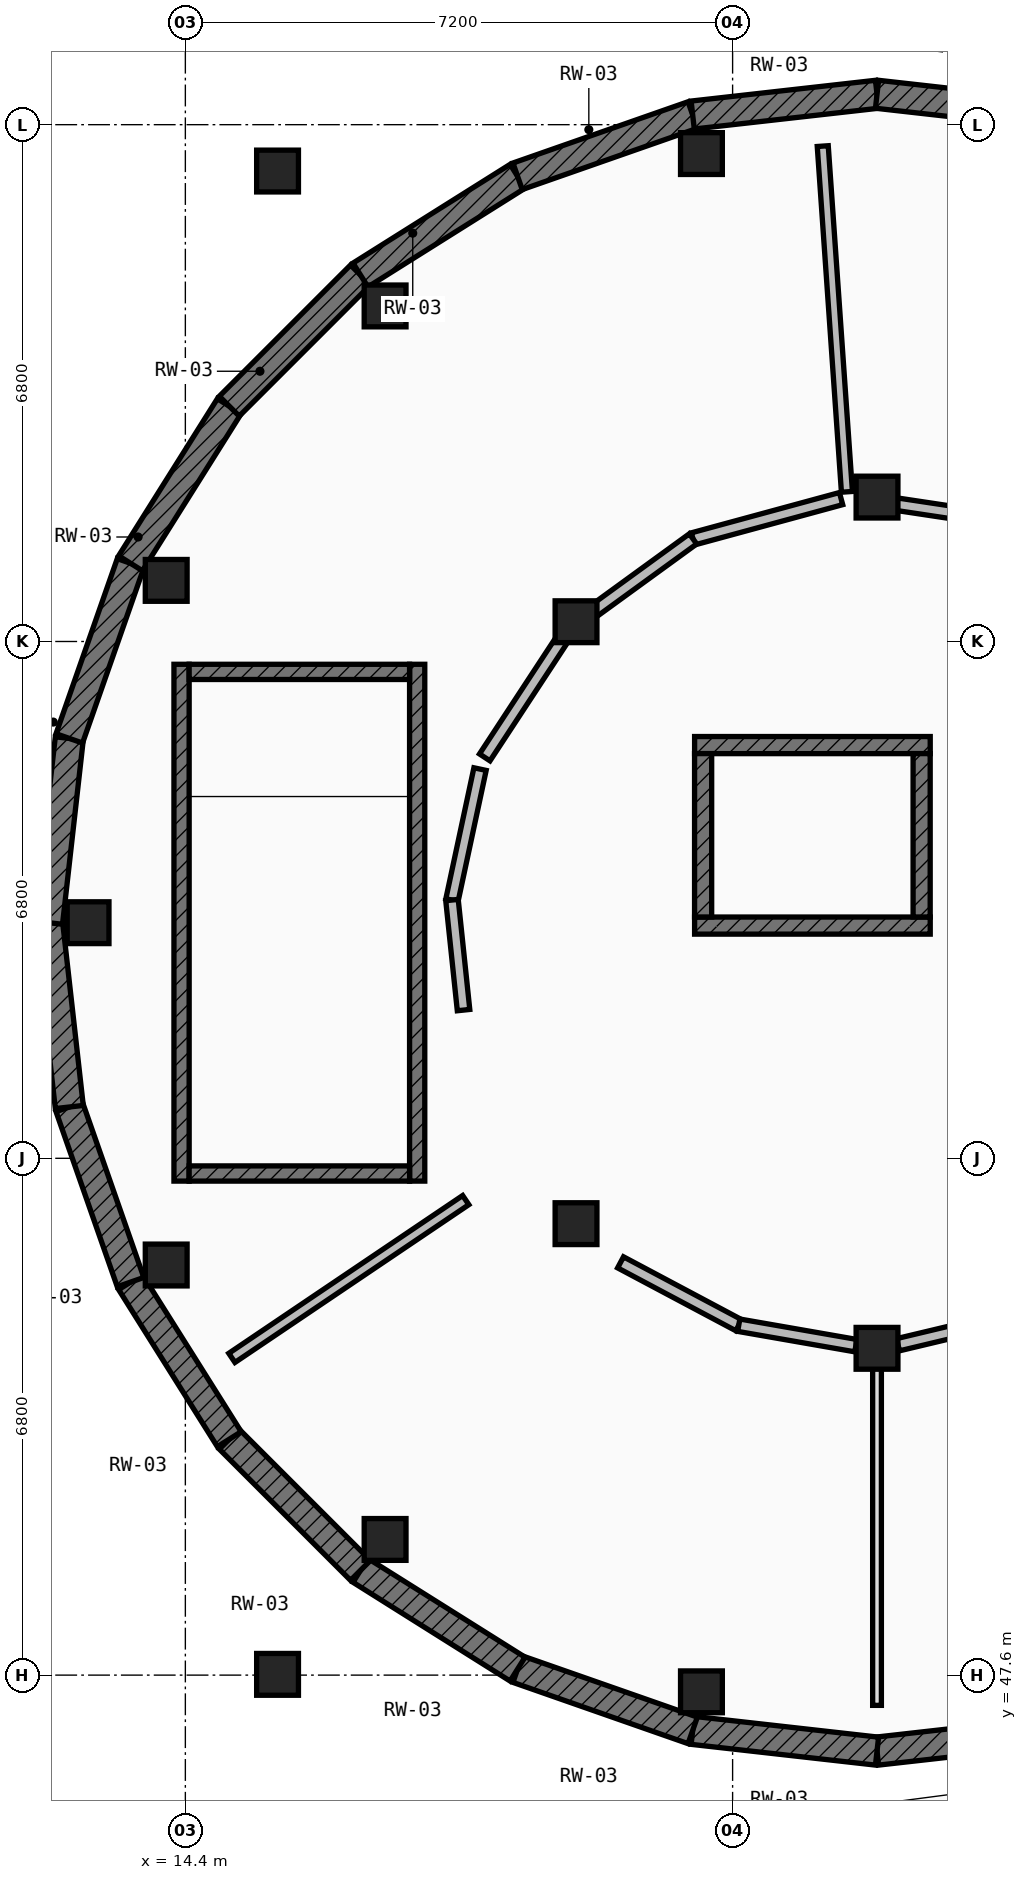
"""IFC4 building model, lengths in metres.
Left out: names, types, materials, properties, quantities, classifications, styles, units other than length and angle.
Written with IfcOpenShell. Run it as: python <this file> out.ifc"""

import sys

from ifc_helpers import new_model, si_unit, direction, frame, frame_2d, origin, origin_2d, place, context, subcontext, project, spatial, rectangle, extrude, element, fill, save


model = new_model("IFC4")
c1 = context("Model", 3, precision=1e-05, world=origin(), true_north=direction((0.0, 1.0)))
c2 = subcontext(c1, "Body", "Model", "MODEL_VIEW")
j1 = project(units=[si_unit("LENGTHUNIT", "METRE"), si_unit("PLANEANGLEUNIT", "RADIAN")], contexts=[c1])
p1 = place(None, origin())
s1 = spatial("IfcSite", under=j1, at=p1, CompositionType="ELEMENT")
p2 = place(p1, origin())
s2 = spatial("IfcBuilding", under=s1, at=p2, CompositionType="ELEMENT")
p3 = place(p2, frame((0.0, 0.0, -4.55)))
s3 = spatial("IfcBuildingStorey", under=s2, at=p3, CompositionType="ELEMENT", Elevation=-4.55)
for number, where, z_axis, x_axis in (
    (1, (21.19, 67.62, 0.0), (0.0, 0.0, 1.0), (1.0, 0.0, 0.0)),
    (2, (17.028, 65.615, 0.0), (0.0, 0.0, 1.0), (1.0, 0.0, 0.0)),
    (3, (14.148, 62.004, 0.0), (0.0, 0.0, 1.0), (1.0, 0.0, 0.0)),
    (4, (13.12, 57.5, 0.0), (0.0, 0.0, 1.0), (1.0, 0.0, 0.0)),
    (5, (14.148, 52.996, 0.0), (0.0, 0.0, 1.0), (1.0, 0.0, 0.0)),
    (6, (17.028, 49.385, 0.0), (0.0, 0.0, 1.0), (1.0, 0.0, 0.0)),
    (7, (21.19, 47.38, 0.0), (0.0, 0.0, 1.0), (1.0, 0.0, 0.0)),
    (8, (23.5, 63.1, 0.0), (0.0, 0.0, 1.0), (1.0, 0.0, 0.0)),
    (9, (19.54, 61.46, 0.0), (0.0, 0.0, 1.0), (1.0, 0.0, 0.0)),
    (10, (19.54, 53.54, 0.0), (0.0, 0.0, 1.0), (1.0, 0.0, 0.0)),
    (11, (23.5, 51.9, 0.0), (0.0, 0.0, 1.0), (1.0, 0.0, 0.0)),
):
    element("IfcColumn", number, at=place(p3, frame(where, z_axis=z_axis, x_axis=x_axis)), inside=s3, PredefinedType="COLUMN", context=c2, shape_type="SweptSolid", body=[
        extrude(rectangle(XDim=0.55, YDim=0.55, at=origin_2d()), origin(), (0.0, 0.0, 1.0), 4.55),
    ])
for number, where, z_axis, x_axis in (
    (12, (15.613, 67.39, 0.0), (0.0, 0.0, 1.0), (1.0, 0.0, 0.0)),
    (13, (15.613, 47.61, 0.0), (0.0, 0.0, 1.0), (1.0, 0.0, 0.0)),
):
    element("IfcColumn", number, at=place(p3, frame(where, z_axis=z_axis, x_axis=x_axis)), inside=s3, PredefinedType="COLUMN", context=c2, shape_type="SweptSolid", body=[
        extrude(rectangle(XDim=0.55, YDim=0.55, at=origin_2d()), origin(), (0.0, 0.0, 1.0), 5.7),
    ])
for number, where, z_axis, x_axis in (
    (14, (25.925, 46.873, 0.0), (0.0, 0.0, 1.0), (-0.994, -0.112, 0.0)),
    (15, (23.5, 46.6, 0.0), (0.0, 0.0, 1.0), (-0.994, 0.112, 0.0)),
):
    element("IfcWall", number, at=place(p3, frame(where, z_axis=z_axis, x_axis=x_axis)), inside=s3, PredefinedType="USERDEFINED", context=c2, shape_type="SweptSolid", body=[
        extrude(rectangle(XDim=2.44, YDim=0.37, at=frame_2d((1.22, 0.0))), origin(), (0.0, 0.0, 1.0), 3.335),
    ])
p4 = place(p3, frame((21.075, 46.873, 0.0), z_axis=(0.0, 0.0, 1.0), x_axis=(-0.943919156274, 0.330176659411, 0.0)))
e16 = element("IfcWall", 16, at=p4, inside=s3, PredefinedType="USERDEFINED", context=c2, shape_type="SweptSolid", body=[
    extrude(rectangle(XDim=2.441, YDim=0.37, at=frame_2d((1.22, 0.0))), origin(), (0.0, 0.0, 1.0), 3.335),
])
p5 = place(p3, frame((18.771, 47.679, 0.0), z_axis=(0.0, 0.0, 1.0), x_axis=(-0.846658434148, 0.532136726684, 0.0)))
e17 = element("IfcWall", 17, at=p5, inside=s3, PredefinedType="USERDEFINED", context=c2, shape_type="SweptSolid", body=[
    extrude(rectangle(XDim=2.441, YDim=0.37, at=frame_2d((1.221, 0.0))), origin(), (0.0, 0.0, 1.0), 3.335),
])
p6 = place(p3, frame((16.704, 48.978, 0.0), z_axis=(0.0, 0.0, 1.0), x_axis=(-0.707106781187, 0.707106781187, 0.0)))
e18 = element("IfcWall", 18, at=p6, inside=s3, PredefinedType="USERDEFINED", context=c2, shape_type="SweptSolid", body=[
    extrude(rectangle(XDim=2.441, YDim=0.37, at=frame_2d((1.22, 0.0))), origin(), (0.0, 0.0, 1.0), 3.335),
])
p7 = place(p3, frame((14.978, 50.704, 0.0), z_axis=(0.0, 0.0, 1.0), x_axis=(-0.532136726684, 0.846658434148, 0.0)))
e19 = element("IfcWall", 19, at=p7, inside=s3, PredefinedType="USERDEFINED", context=c2, shape_type="SweptSolid", body=[
    extrude(rectangle(XDim=2.441, YDim=0.37, at=frame_2d((1.221, 0.0))), origin(), (0.0, 0.0, 1.0), 3.335),
])
p8 = place(p3, frame((13.679, 52.771, 0.0), z_axis=(0.0, 0.0, 1.0), x_axis=(-0.330176659411, 0.943919156274, 0.0)))
e20 = element("IfcWall", 20, at=p8, inside=s3, PredefinedType="USERDEFINED", context=c2, shape_type="SweptSolid", body=[
    extrude(rectangle(XDim=2.441, YDim=0.37, at=frame_2d((1.22, 0.0))), origin(), (0.0, 0.0, 1.0), 3.335),
])
for number, where, z_axis, x_axis in (
    (21, (12.873, 55.075, 0.0), (0.0, 0.0, 1.0), (-0.112, 0.994, 0.0)),
    (22, (12.6, 57.5, 0.0), (0.0, 0.0, 1.0), (0.112, 0.994, 0.0)),
):
    element("IfcWall", number, at=place(p3, frame(where, z_axis=z_axis, x_axis=x_axis)), inside=s3, PredefinedType="USERDEFINED", context=c2, shape_type="SweptSolid", body=[
        extrude(rectangle(XDim=2.44, YDim=0.37, at=frame_2d((1.22, 0.0))), origin(), (0.0, 0.0, 1.0), 3.335),
    ])
p9 = place(p3, frame((12.873, 59.925, 0.0), z_axis=(0.0, 0.0, 1.0), x_axis=(0.330176659411, 0.943919156274, 0.0)))
e23 = element("IfcWall", 23, at=p9, inside=s3, PredefinedType="USERDEFINED", context=c2, shape_type="SweptSolid", body=[
    extrude(rectangle(XDim=2.441, YDim=0.37, at=frame_2d((1.22, 0.0))), origin(), (0.0, 0.0, 1.0), 3.335),
])
p10 = place(p3, frame((13.679, 62.229, 0.0), z_axis=(0.0, 0.0, 1.0), x_axis=(0.532136726684, 0.846658434148, 0.0)))
e24 = element("IfcWall", 24, at=p10, inside=s3, PredefinedType="USERDEFINED", context=c2, shape_type="SweptSolid", body=[
    extrude(rectangle(XDim=2.441, YDim=0.37, at=frame_2d((1.221, 0.0))), origin(), (0.0, 0.0, 1.0), 3.335),
])
p11 = place(p3, frame((14.978, 64.296, 0.0), z_axis=(0.0, 0.0, 1.0), x_axis=(0.707106781187, 0.707106781187, 0.0)))
e25 = element("IfcWall", 25, at=p11, inside=s3, PredefinedType="USERDEFINED", context=c2, shape_type="SweptSolid", body=[
    extrude(rectangle(XDim=2.441, YDim=0.37, at=frame_2d((1.22, 0.0))), origin(), (0.0, 0.0, 1.0), 3.335),
])
p12 = place(p3, frame((16.704, 66.022, 0.0), z_axis=(0.0, 0.0, 1.0), x_axis=(0.846658434148, 0.532136726684, 0.0)))
e26 = element("IfcWall", 26, at=p12, inside=s3, PredefinedType="USERDEFINED", context=c2, shape_type="SweptSolid", body=[
    extrude(rectangle(XDim=2.441, YDim=0.37, at=frame_2d((1.221, 0.0))), origin(), (0.0, 0.0, 1.0), 3.335),
])
p13 = place(p3, frame((18.771, 67.321, 0.0), z_axis=(0.0, 0.0, 1.0), x_axis=(0.943919156274, 0.330176659411, 0.0)))
e27 = element("IfcWall", 27, at=p13, inside=s3, PredefinedType="USERDEFINED", context=c2, shape_type="SweptSolid", body=[
    extrude(rectangle(XDim=2.441, YDim=0.37, at=frame_2d((1.22, 0.0))), origin(), (0.0, 0.0, 1.0), 3.335),
])
for number, where, z_axis, x_axis in (
    (28, (21.075, 68.127, 0.0), (0.0, 0.0, 1.0), (0.994, 0.112, 0.0)),
    (29, (23.5, 68.4, 0.0), (0.0, 0.0, 1.0), (0.994, -0.112, 0.0)),
):
    element("IfcWall", number, at=place(p3, frame(where, z_axis=z_axis, x_axis=x_axis)), inside=s3, PredefinedType="USERDEFINED", context=c2, shape_type="SweptSolid", body=[
        extrude(rectangle(XDim=2.44, YDim=0.37, at=frame_2d((1.22, 0.0))), origin(), (0.0, 0.0, 1.0), 3.335),
    ])
p14 = place(p3, frame((17.45, 54.1, 0.0), z_axis=(0.0, 0.0, 1.0), x_axis=(0.0, 1.0, 0.0)))
e30 = element("IfcWall", 30, at=p14, inside=s3, PredefinedType="SHEAR", context=c2, shape_type="SweptSolid", body=[
    extrude(rectangle(XDim=6.8, YDim=0.2, at=frame_2d((3.4, 0.0))), origin(), (0.0, 0.0, 1.0), 4.135),
])
p15 = place(p14, frame((0.38, 0.0, 0.0)))
e31 = element("IfcOpeningElement", 31, at=p15, cuts=e30, PredefinedType="OPENING", context=c2, shape_type="SweptSolid", body=[
    extrude(rectangle(XDim=1.05, YDim=2.15, at=frame_2d((0.525, 1.075))), frame((0.0, 0.11, 0.0), z_axis=(0.0, -1.0, 0.0), x_axis=(1.0, 0.0, 0.0)), (0.0, 0.0, 1.0), 0.22),
])
p16 = place(p3, frame((14.35, 54.1, 0.0), z_axis=(0.0, 0.0, 1.0), x_axis=(0.0, 1.0, 0.0)))
e32 = element("IfcWall", 32, at=p16, inside=s3, PredefinedType="SHEAR", context=c2, shape_type="SweptSolid", body=[
    extrude(rectangle(XDim=6.8, YDim=0.2, at=frame_2d((3.4, 0.0))), origin(), (0.0, 0.0, 1.0), 4.135),
])
for number, where, z_axis, x_axis in (
    (33, (17.35, 54.2, 0.0), (0.0, 0.0, 1.0), (-1.0, 0.0, 0.0)),
    (34, (17.35, 60.8, 0.0), (0.0, 0.0, 1.0), (-1.0, 0.0, 0.0)),
):
    element("IfcWall", number, at=place(p3, frame(where, z_axis=z_axis, x_axis=x_axis)), inside=s3, PredefinedType="SHEAR", context=c2, shape_type="SweptSolid", body=[
        extrude(rectangle(XDim=2.9, YDim=0.2, at=frame_2d((1.45, 0.0))), origin(), (0.0, 0.0, 1.0), 4.135),
    ])
p17 = place(p3, frame((21.1, 57.462, 0.0), z_axis=(0.0, 0.0, 1.0), x_axis=(1.0, 0.0, 0.0)))
e35 = element("IfcWall", 35, at=p17, inside=s3, PredefinedType="SHEAR", context=c2, shape_type="SweptSolid", body=[
    extrude(rectangle(XDim=3.1, YDim=0.225, at=frame_2d((1.55, 0.0))), origin(), (0.0, 0.0, 1.0), 4.135),
])
p18 = place(p17, frame((0.95, 0.0, 0.0)))
e36 = element("IfcOpeningElement", 36, at=p18, cuts=e35, PredefinedType="OPENING", context=c2, shape_type="SweptSolid", body=[
    extrude(rectangle(XDim=1.2, YDim=2.2, at=frame_2d((0.6, 1.1))), frame((0.0, 0.123, 0.0), z_axis=(0.0, -1.0, 0.0), x_axis=(1.0, 0.0, 0.0)), (0.0, 0.0, 1.0), 0.245),
])
p19 = place(p3, frame((21.1, 59.837, 0.0), z_axis=(0.0, 0.0, 1.0), x_axis=(1.0, 0.0, 0.0)))
e37 = element("IfcWall", 37, at=p19, inside=s3, PredefinedType="SHEAR", context=c2, shape_type="SweptSolid", body=[
    extrude(rectangle(XDim=3.1, YDim=0.225, at=frame_2d((1.55, 0.0))), origin(), (0.0, 0.0, 1.0), 4.135),
])
for number, where, z_axis, x_axis in (
    (38, (21.212, 57.575, 0.0), (0.0, 0.0, 1.0), (0.0, 1.0, 0.0)),
    (39, (24.087, 57.575, 0.0), (0.0, 0.0, 1.0), (0.0, 1.0, 0.0)),
):
    element("IfcWall", number, at=place(p3, frame(where, z_axis=z_axis, x_axis=x_axis)), inside=s3, PredefinedType="SHEAR", context=c2, shape_type="SweptSolid", body=[
        extrude(rectangle(XDim=2.15, YDim=0.225, at=frame_2d((1.075, 0.0))), origin(), (0.0, 0.0, 1.0), 4.135),
    ])
p20 = place(p3, frame((23.104, 63.169, 0.0), z_axis=(0.0, 0.0, 1.0), x_axis=(-0.069759335413, 0.997563850148, 0.0)))
e40 = element("IfcWall", 40, at=p20, inside=s3, PredefinedType="PARTITIONING", context=c2, shape_type="SweptSolid", body=[
    extrude(rectangle(XDim=4.56, YDim=0.145, at=frame_2d((2.28, 0.0))), origin(), (0.0, 0.0, 1.0), 3.31),
])
p21 = place(p3, frame((18.089, 53.85, 0.0), z_axis=(0.0, 0.0, 1.0), x_axis=(-0.828961502122, -0.559305665982, 0.0)))
e41 = element("IfcWall", 41, at=p21, inside=s3, PredefinedType="PARTITIONING", context=c2, shape_type="SweptSolid", body=[
    extrude(rectangle(XDim=3.712, YDim=0.145, at=frame_2d((1.856, 0.0))), origin(), (0.0, 0.0, 1.0), 3.31),
])
p22 = place(p3, frame((23.5, 51.817, 0.0), z_axis=(0.0, 0.0, 1.0), x_axis=(0.0, -1.0, 0.0)))
e42 = element("IfcWall", 42, at=p22, inside=s3, PredefinedType="PARTITIONING", context=c2, shape_type="SweptSolid", body=[
    extrude(rectangle(XDim=4.615, YDim=0.115, at=frame_2d((2.308, 0.0))), origin(), (0.0, 0.0, 1.0), 3.31),
])
p23 = place(p3, frame((25.441, 62.753, 0.0), z_axis=(0.0, 0.0, 1.0), x_axis=(-0.988808298797, 0.149191649331, 0.0)))
e43 = element("IfcWall", 43, at=p23, inside=s3, PredefinedType="PARTITIONING", context=c2, shape_type="SweptSolid", body=[
    extrude(rectangle(XDim=1.697, YDim=0.165, at=frame_2d((0.849, 0.0))), origin(), (0.0, 0.0, 1.0), 3.31),
])
p24 = place(p3, frame((23.027, 63.08, 0.0), z_axis=(0.0, 0.0, 1.0), x_axis=(-0.964919932979, -0.262544325667, 0.0)))
e44 = element("IfcWall", 44, at=p24, inside=s3, PredefinedType="PARTITIONING", context=c2, shape_type="SweptSolid", body=[
    extrude(rectangle(XDim=2.019, YDim=0.165, at=frame_2d((1.009, 0.0))), origin(), (0.0, 0.0, 1.0), 3.31),
])
p25 = place(p24, frame((0.389, 0.0, 0.0)))
e45 = element("IfcOpeningElement", 45, at=p25, cuts=e44, PredefinedType="OPENING", context=c2, shape_type="SweptSolid", body=[
    extrude(rectangle(XDim=1.24, YDim=2.22, at=frame_2d((0.62, 1.11))), frame((0.0, 0.093, 0.0), z_axis=(0.0, -1.0, 0.0), x_axis=(1.0, 0.0, 0.0)), (0.0, 0.0, 1.0), 0.185),
])
p26 = place(p3, frame((21.079, 62.55, 0.0), z_axis=(0.0, 0.0, 1.0), x_axis=(-0.808860869398, -0.588000079895, 0.0)))
e46 = element("IfcWall", 46, at=p26, inside=s3, PredefinedType="PARTITIONING", context=c2, shape_type="SweptSolid", body=[
    extrude(rectangle(XDim=1.607, YDim=0.165, at=frame_2d((0.804, 0.0))), origin(), (0.0, 0.0, 1.0), 3.31),
])
p27 = place(p3, frame((19.366, 61.241, 0.0), z_axis=(0.0, 0.0, 1.0), x_axis=(-0.548365930053, -0.836238486771, 0.0)))
e47 = element("IfcWall", 47, at=p27, inside=s3, PredefinedType="PARTITIONING", context=c2, shape_type="SweptSolid", body=[
    extrude(rectangle(XDim=1.873, YDim=0.165, at=frame_2d((0.936, 0.0))), origin(), (0.0, 0.0, 1.0), 3.31),
])
p28 = place(p3, frame((18.277, 59.521, 0.0), z_axis=(0.0, 0.0, 1.0), x_axis=(-0.209500701014, -0.977808496729, 0.0)))
e48 = element("IfcWall", 48, at=p28, inside=s3, PredefinedType="PARTITIONING", context=c2, shape_type="SweptSolid", body=[
    extrude(rectangle(XDim=1.762, YDim=0.165, at=frame_2d((0.881, 0.0))), origin(), (0.0, 0.0, 1.0), 3.31),
])
p29 = place(p3, frame((17.908, 57.798, 0.0), z_axis=(0.0, 0.0, 1.0), x_axis=(0.10446656428, -0.994528399267, 0.0)))
e49 = element("IfcWall", 49, at=p29, inside=s3, PredefinedType="PARTITIONING", context=c2, shape_type="SweptSolid", body=[
    extrude(rectangle(XDim=1.456, YDim=0.165, at=frame_2d((0.728, 0.0))), origin(), (0.0, 0.0, 1.0), 3.31),
])
p30 = place(p3, frame((20.126, 53.031, 0.0), z_axis=(0.0, 0.0, 1.0), x_axis=(0.882916409472, -0.469530205508, 0.0)))
e50 = element("IfcWall", 50, at=p30, inside=s3, PredefinedType="PARTITIONING", context=c2, shape_type="SweptSolid", body=[
    extrude(rectangle(XDim=1.761, YDim=0.165, at=frame_2d((0.881, 0.0))), origin(), (0.0, 0.0, 1.0), 3.31),
])
p31 = place(p30, frame((0.221, 0.0, 0.0)))
e51 = element("IfcOpeningElement", 51, at=p31, cuts=e50, PredefinedType="OPENING", context=c2, shape_type="SweptSolid", body=[
    extrude(rectangle(XDim=1.32, YDim=2.24, at=frame_2d((0.66, 1.12))), frame((0.0, 0.093, 0.0), z_axis=(0.0, -1.0, 0.0), x_axis=(1.0, 0.0, 0.0)), (0.0, 0.0, 1.0), 0.185),
])
p32 = place(p3, frame((21.681, 52.204, 0.0), z_axis=(0.0, 0.0, 1.0), x_axis=(0.985099289187, -0.171986599601, 0.0)))
e52 = element("IfcWall", 52, at=p32, inside=s3, PredefinedType="PARTITIONING", context=c2, shape_type="SweptSolid", body=[
    extrude(rectangle(XDim=1.564, YDim=0.165, at=frame_2d((0.782, 0.0))), origin(), (0.0, 0.0, 1.0), 3.31),
])
p33 = place(p3, frame((23.776, 51.947, 0.0), z_axis=(0.0, 0.0, 1.0), x_axis=(0.972689167377, 0.232111575903, 0.0)))
e53 = element("IfcWall", 53, at=p33, inside=s3, PredefinedType="PARTITIONING", context=c2, shape_type="SweptSolid", body=[
    extrude(rectangle(XDim=2.24, YDim=0.165, at=frame_2d((1.12, 0.0))), origin(), (0.0, 0.0, 1.0), 3.31),
])
p34 = place(p33, frame((0.68, 0.0, 0.0)))
e54 = element("IfcOpeningElement", 54, at=p34, cuts=e53, PredefinedType="OPENING", context=c2, shape_type="SweptSolid", body=[
    extrude(rectangle(XDim=0.88, YDim=2.1, at=frame_2d((0.44, 1.05))), frame((0.0, 0.093, 0.0), z_axis=(0.0, -1.0, 0.0), x_axis=(1.0, 0.0, 0.0)), (0.0, 0.0, 1.0), 0.185),
])
p35 = place(p15, origin())
e55 = element("IfcDoor", 55, at=p35, inside=s3, OperationType="SINGLE_SWING_RIGHT", PredefinedType="DOOR", context=c2, shape_type="SweptSolid", body=[
    extrude(rectangle(XDim=1.05, YDim=2.15, at=frame_2d((0.525, 1.075))), frame((0.0, 0.025, 0.0), z_axis=(0.0, -1.0, 0.0), x_axis=(1.0, 0.0, 0.0)), (0.0, 0.0, 1.0), 0.05),
])
fill(e31, e55)
p36 = place(p18, origin())
e56 = element("IfcDoor", 56, at=p36, inside=s3, OperationType="DOUBLE_DOOR_SLIDING", PredefinedType="DOOR", context=c2, shape_type="SweptSolid", body=[
    extrude(rectangle(XDim=1.2, YDim=2.2, at=frame_2d((0.6, 1.1))), frame((0.0, 0.025, 0.0), z_axis=(0.0, -1.0, 0.0), x_axis=(1.0, 0.0, 0.0)), (0.0, 0.0, 1.0), 0.05),
])
fill(e36, e56)
p37 = place(p25, origin())
e57 = element("IfcDoor", 57, at=p37, inside=s3, OperationType="SINGLE_SWING_LEFT", PredefinedType="DOOR", context=c2, shape_type="SweptSolid", body=[
    extrude(rectangle(XDim=1.24, YDim=2.22, at=frame_2d((0.62, 1.11))), frame((0.0, 0.025, 0.0), z_axis=(0.0, -1.0, 0.0), x_axis=(1.0, 0.0, 0.0)), (0.0, 0.0, 1.0), 0.05),
])
fill(e45, e57)
p38 = place(p31, origin())
e58 = element("IfcDoor", 58, at=p38, inside=s3, OperationType="SINGLE_SWING_RIGHT", PredefinedType="DOOR", context=c2, shape_type="SweptSolid", body=[
    extrude(rectangle(XDim=1.32, YDim=2.24, at=frame_2d((0.66, 1.12))), frame((0.0, 0.025, 0.0), z_axis=(0.0, -1.0, 0.0), x_axis=(1.0, 0.0, 0.0)), (0.0, 0.0, 1.0), 0.05),
])
fill(e51, e58)
save(model, sys.argv[1])
